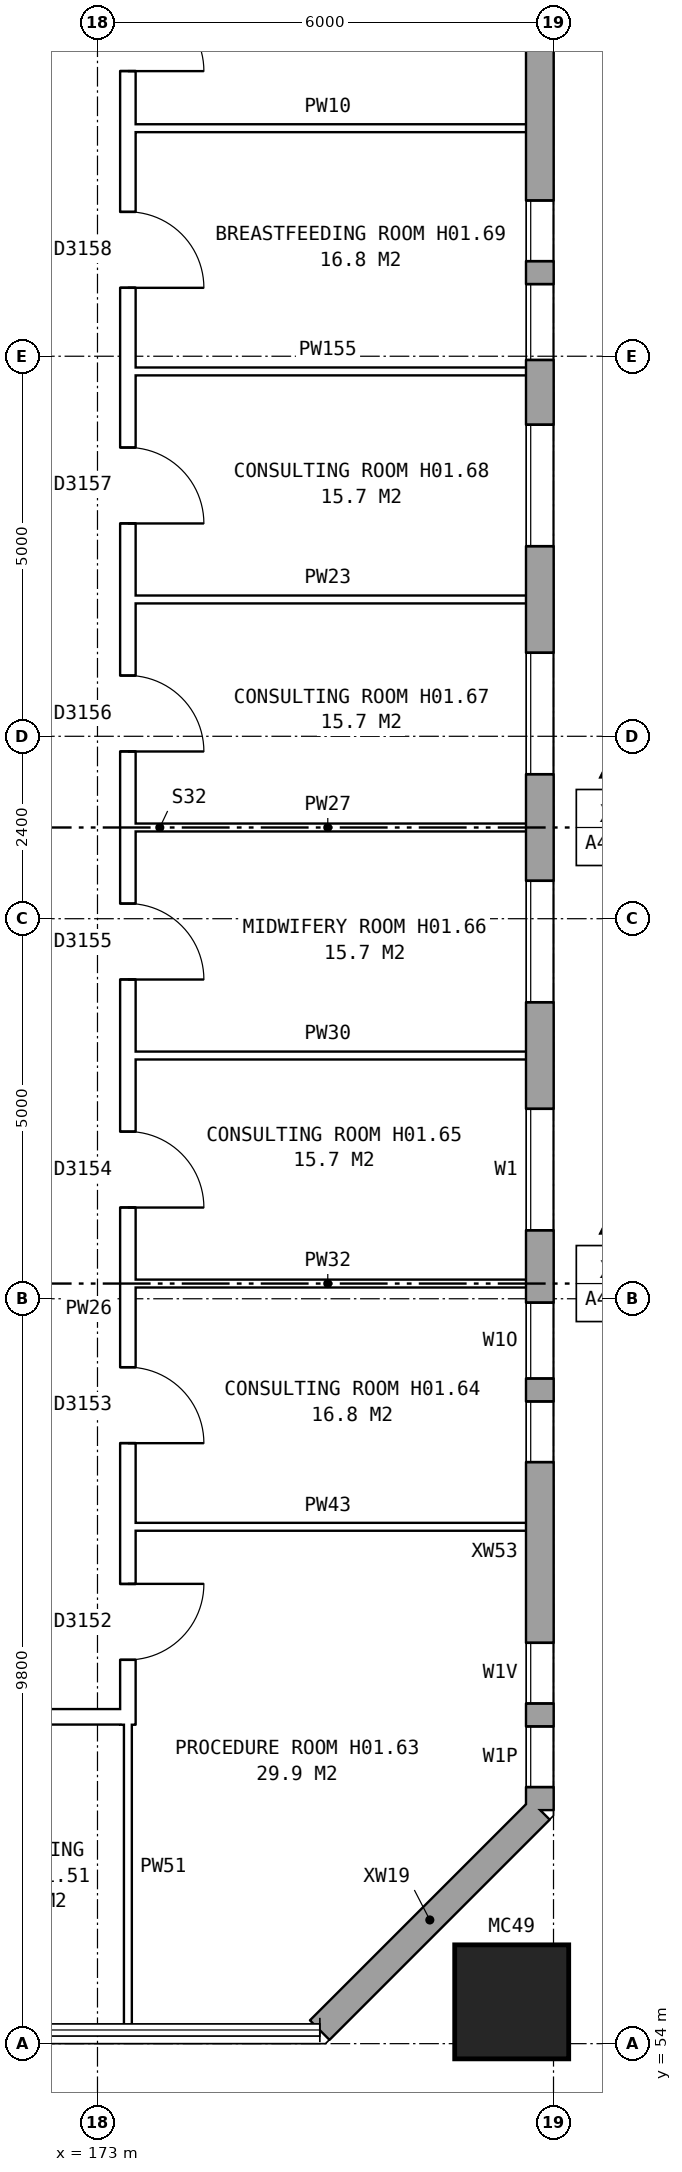
"""IFC4 building model, lengths in metres.
Left out: names, types, materials, properties, quantities, classifications, styles, units other than length and angle.
Written with IfcOpenShell. Run it as: python <this file> out.ifc"""

import sys

from ifc_helpers import new_model, si_unit, direction, frame, frame_2d, origin, origin_2d, place, context, subcontext, project, spatial, rectangle, hollow_rectangle, extrude, element, fill, save


model = new_model("IFC4")
c1 = context("Model", 3, precision=1e-05, world=origin(), true_north=direction((0.0, 1.0)))
c2 = subcontext(c1, "Body", "Model", "MODEL_VIEW")
j1 = project(units=[si_unit("LENGTHUNIT", "METRE"), si_unit("PLANEANGLEUNIT", "RADIAN")], contexts=[c1])
p1 = place(None, origin())
s1 = spatial("IfcSite", under=j1, at=p1, CompositionType="ELEMENT")
p2 = place(p1, origin())
s2 = spatial("IfcBuilding", under=s1, at=p2, CompositionType="ELEMENT")
p3 = place(p2, frame((0.0, 0.0, 5.5)))
s3 = spatial("IfcBuildingStorey", under=s2, at=p3, CompositionType="ELEMENT", Elevation=5.5)
p4 = place(p3, frame((178.45, 54.55, 0.0), z_axis=(0.0, 0.0, 1.0), x_axis=(1.0, 0.0, 0.0)))
e1 = element("IfcColumn", 1, at=p4, inside=s3, PredefinedType="COLUMN", context=c2, shape_type="SweptSolid", body=[
    extrude(hollow_rectangle(XDim=1.5, YDim=1.5, WallThickness=0.08, at=origin_2d()), origin(), (0.0, 0.0, 1.0), 4.6),
])
p5 = place(p3, frame((175.925, 54.18, 0.0), z_axis=(0.0, 0.0, 1.0), x_axis=(0.707106781187, 0.707106781187, 0.0)))
e2 = element("IfcWall", 2, at=p5, inside=s3, PredefinedType="STANDARD", context=c2, shape_type="SweptSolid", body=[
    extrude(rectangle(XDim=4.094, YDim=0.36, at=frame_2d((2.047, 0.0))), origin(), (0.0, 0.0, 1.0), 4.3),
])
p6 = place(p3, frame((178.82, 57.075, 0.0), z_axis=(0.0, 0.0, 1.0), x_axis=(0.0, 1.0, 0.0)))
e3 = element("IfcWall", 3, at=p6, inside=s3, PredefinedType="STANDARD", context=c2, shape_type="SweptSolid", body=[
    extrude(rectangle(XDim=25.851, YDim=0.36, at=frame_2d((12.925, 0.0))), origin(), (0.0, 0.0, 1.0), 4.3),
])
p7 = place(p6, frame((0.3, 0.0, 1.4)))
e4 = element("IfcOpeningElement", 4, at=p7, cuts=e3, PredefinedType="OPENING", context=c2, shape_type="SweptSolid", body=[
    extrude(rectangle(XDim=0.8, YDim=1.2, at=frame_2d((0.4, 0.6))), frame((0.0, 0.19, 0.0), z_axis=(0.0, -1.0, 0.0), x_axis=(1.0, 0.0, 0.0)), (0.0, 0.0, 1.0), 0.38),
])
p8 = place(p6, frame((4.575, 0.0, 0.8)))
e5 = element("IfcOpeningElement", 5, at=p8, cuts=e3, PredefinedType="OPENING", context=c2, shape_type="SweptSolid", body=[
    extrude(rectangle(XDim=0.8, YDim=0.9, at=frame_2d((0.4, 0.45))), frame((0.0, 0.19, 0.0), z_axis=(0.0, -1.0, 0.0), x_axis=(1.0, 0.0, 0.0)), (0.0, 0.0, 1.0), 0.38),
])
p9 = place(p6, frame((7.625, 0.0, 0.8)))
e6 = element("IfcOpeningElement", 6, at=p9, cuts=e3, PredefinedType="OPENING", context=c2, shape_type="SweptSolid", body=[
    extrude(rectangle(XDim=1.6, YDim=1.8, at=frame_2d((0.8, 0.9))), frame((0.0, 0.19, 0.0), z_axis=(0.0, -1.0, 0.0), x_axis=(1.0, 0.0, 0.0)), (0.0, 0.0, 1.0), 0.38),
])
p10 = place(p6, frame((10.625, 0.0, 0.8)))
e7 = element("IfcOpeningElement", 7, at=p10, cuts=e3, PredefinedType="OPENING", context=c2, shape_type="SweptSolid", body=[
    extrude(rectangle(XDim=1.6, YDim=1.8, at=frame_2d((0.8, 0.9))), frame((0.0, 0.19, 0.0), z_axis=(0.0, -1.0, 0.0), x_axis=(1.0, 0.0, 0.0)), (0.0, 0.0, 1.0), 0.38),
])
p11 = place(p6, frame((13.625, 0.0, 0.8)))
e8 = element("IfcOpeningElement", 8, at=p11, cuts=e3, PredefinedType="OPENING", context=c2, shape_type="SweptSolid", body=[
    extrude(rectangle(XDim=1.6, YDim=1.8, at=frame_2d((0.8, 0.9))), frame((0.0, 0.19, 0.0), z_axis=(0.0, -1.0, 0.0), x_axis=(1.0, 0.0, 0.0)), (0.0, 0.0, 1.0), 0.38),
])
p12 = place(p6, frame((16.625, 0.0, 0.8)))
e9 = element("IfcOpeningElement", 9, at=p12, cuts=e3, PredefinedType="OPENING", context=c2, shape_type="SweptSolid", body=[
    extrude(rectangle(XDim=1.6, YDim=1.8, at=frame_2d((0.8, 0.9))), frame((0.0, 0.19, 0.0), z_axis=(0.0, -1.0, 0.0), x_axis=(1.0, 0.0, 0.0)), (0.0, 0.0, 1.0), 0.38),
])
p13 = place(p6, frame((19.075, 0.0, 0.8)))
e10 = element("IfcOpeningElement", 10, at=p13, cuts=e3, PredefinedType="OPENING", context=c2, shape_type="SweptSolid", body=[
    extrude(rectangle(XDim=1.0, YDim=1.2, at=frame_2d((0.5, 0.6))), frame((0.0, 0.19, 0.0), z_axis=(0.0, -1.0, 0.0), x_axis=(1.0, 0.0, 0.0)), (0.0, 0.0, 1.0), 0.38),
])
p14 = place(p6, frame((23.525, 0.0, 1.7)))
e11 = element("IfcOpeningElement", 11, at=p14, cuts=e3, PredefinedType="OPENING", context=c2, shape_type="SweptSolid", body=[
    extrude(rectangle(XDim=0.8, YDim=0.9, at=frame_2d((0.4, 0.45))), frame((0.0, 0.19, 0.0), z_axis=(0.0, -1.0, 0.0), x_axis=(1.0, 0.0, 0.0)), (0.0, 0.0, 1.0), 0.38),
])
p15 = place(p6, frame((1.4, 0.0, 1.7)))
e12 = element("IfcOpeningElement", 12, at=p15, cuts=e3, PredefinedType="OPENING", context=c2, shape_type="SweptSolid", body=[
    extrude(rectangle(XDim=0.8, YDim=0.9, at=frame_2d((0.4, 0.45))), frame((0.0, 0.19, 0.0), z_axis=(0.0, -1.0, 0.0), x_axis=(1.0, 0.0, 0.0)), (0.0, 0.0, 1.0), 0.38),
])
p16 = place(p6, frame((5.675, 0.0, 0.8)))
e13 = element("IfcOpeningElement", 13, at=p16, cuts=e3, PredefinedType="OPENING", context=c2, shape_type="SweptSolid", body=[
    extrude(rectangle(XDim=1.0, YDim=1.2, at=frame_2d((0.5, 0.6))), frame((0.0, 0.19, 0.0), z_axis=(0.0, -1.0, 0.0), x_axis=(1.0, 0.0, 0.0)), (0.0, 0.0, 1.0), 0.38),
])
p17 = place(p6, frame((20.375, 0.0, 0.8)))
e14 = element("IfcOpeningElement", 14, at=p17, cuts=e3, PredefinedType="OPENING", context=c2, shape_type="SweptSolid", body=[
    extrude(rectangle(XDim=0.8, YDim=0.9, at=frame_2d((0.4, 0.45))), frame((0.0, 0.19, 0.0), z_axis=(0.0, -1.0, 0.0), x_axis=(1.0, 0.0, 0.0)), (0.0, 0.0, 1.0), 0.38),
])
p18 = place(p6, frame((24.625, 0.0, 1.4)))
e15 = element("IfcOpeningElement", 15, at=p18, cuts=e3, PredefinedType="OPENING", context=c2, shape_type="SweptSolid", body=[
    extrude(rectangle(XDim=0.8, YDim=1.2, at=frame_2d((0.4, 0.6))), frame((0.0, 0.19, 0.0), z_axis=(0.0, -1.0, 0.0), x_axis=(1.0, 0.0, 0.0)), (0.0, 0.0, 1.0), 0.38),
])
p19 = place(p3, frame((157.53, 58.3, 0.0), z_axis=(0.0, 0.0, 1.0), x_axis=(1.0, 0.0, 0.0)))
e16 = element("IfcWall", 16, at=p19, inside=s3, PredefinedType="PARTITIONING", context=c2, shape_type="SweptSolid", body=[
    extrude(rectangle(XDim=15.97, YDim=0.2, at=frame_2d((7.985, 0.0))), origin(), (0.0, 0.0, 1.0), 4.3),
])
p20 = place(p19, frame((2.795, 0.0, 0.0)))
e17 = element("IfcOpeningElement", 17, at=p20, cuts=e16, PredefinedType="OPENING", context=c2, shape_type="SweptSolid", body=[
    extrude(rectangle(XDim=1.0, YDim=2.1, at=frame_2d((0.5, 1.05))), frame((0.0, 0.11, 0.0), z_axis=(0.0, -1.0, 0.0), x_axis=(1.0, 0.0, 0.0)), (0.0, 0.0, 1.0), 0.22),
])
p21 = place(p19, frame((7.47, 0.0, 0.0)))
e18 = element("IfcOpeningElement", 18, at=p21, cuts=e16, PredefinedType="OPENING", context=c2, shape_type="SweptSolid", body=[
    extrude(rectangle(XDim=1.0, YDim=2.1, at=frame_2d((0.5, 1.05))), frame((0.0, 0.11, 0.0), z_axis=(0.0, -1.0, 0.0), x_axis=(1.0, 0.0, 0.0)), (0.0, 0.0, 1.0), 0.22),
])
p22 = place(p19, frame((10.47, 0.0, 0.0)))
e19 = element("IfcOpeningElement", 19, at=p22, cuts=e16, PredefinedType="OPENING", context=c2, shape_type="SweptSolid", body=[
    extrude(rectangle(XDim=1.0, YDim=2.1, at=frame_2d((0.5, 1.05))), frame((0.0, 0.11, 0.0), z_axis=(0.0, -1.0, 0.0), x_axis=(1.0, 0.0, 0.0)), (0.0, 0.0, 1.0), 0.22),
])
p23 = place(p19, frame((13.67, 0.0, 0.0)))
e20 = element("IfcOpeningElement", 20, at=p23, cuts=e16, PredefinedType="OPENING", context=c2, shape_type="SweptSolid", body=[
    extrude(rectangle(XDim=1.0, YDim=2.1, at=frame_2d((0.5, 1.05))), frame((0.0, 0.11, 0.0), z_axis=(0.0, -1.0, 0.0), x_axis=(1.0, 0.0, 0.0)), (0.0, 0.0, 1.0), 0.22),
])
for number, where, z_axis, x_axis in (
    (21, (173.3, 60.8, 0.0), (0.0, 0.0, 1.0), (1.0, 0.0, 0.0)),
    (22, (173.3, 64.0, 0.0), (0.0, 0.0, 1.0), (1.0, 0.0, 0.0)),
    (23, (173.3, 67.0, 0.0), (0.0, 0.0, 1.0), (1.0, 0.0, 0.0)),
    (24, (173.3, 70.0, 0.0), (0.0, 0.0, 1.0), (1.0, 0.0, 0.0)),
    (25, (173.3, 73.0, 0.0), (0.0, 0.0, 1.0), (1.0, 0.0, 0.0)),
    (26, (173.3, 76.0, 0.0), (0.0, 0.0, 1.0), (1.0, 0.0, 0.0)),
    (27, (173.3, 79.2, 0.0), (0.0, 0.0, 1.0), (1.0, 0.0, 0.0)),
):
    element("IfcWall", number, at=place(p3, frame(where, z_axis=z_axis, x_axis=x_axis)), inside=s3, PredefinedType="PARTITIONING", context=c2, shape_type="SweptSolid", body=[
        extrude(rectangle(XDim=5.46, YDim=0.1, at=frame_2d((2.73, 0.0))), origin(), (0.0, 0.0, 1.0), 4.3),
    ])
p24 = place(p3, frame((173.4, 58.198, 0.0), z_axis=(0.0, 0.0, 1.0), x_axis=(0.0, 1.0, 0.0)))
e28 = element("IfcWall", 28, at=p24, inside=s3, PredefinedType="PARTITIONING", context=c2, shape_type="SweptSolid", body=[
    extrude(rectangle(XDim=23.604, YDim=0.2, at=frame_2d((11.802, 0.0))), origin(), (0.0, 0.0, 1.0), 4.3),
])
p25 = place(p24, frame((0.851, 0.0, 0.0)))
e29 = element("IfcOpeningElement", 29, at=p25, cuts=e28, PredefinedType="OPENING", context=c2, shape_type="SweptSolid", body=[
    extrude(rectangle(XDim=1.0, YDim=2.1, at=frame_2d((0.5, 1.05))), frame((0.0, 0.11, 0.0), z_axis=(0.0, -1.0, 0.0), x_axis=(1.0, 0.0, 0.0)), (0.0, 0.0, 1.0), 0.22),
])
p26 = place(p24, frame((3.702, 0.0, 0.0)))
e30 = element("IfcOpeningElement", 30, at=p26, cuts=e28, PredefinedType="OPENING", context=c2, shape_type="SweptSolid", body=[
    extrude(rectangle(XDim=1.0, YDim=2.1, at=frame_2d((0.5, 1.05))), frame((0.0, 0.11, 0.0), z_axis=(0.0, -1.0, 0.0), x_axis=(1.0, 0.0, 0.0)), (0.0, 0.0, 1.0), 0.22),
])
p27 = place(p24, frame((6.802, 0.0, 0.0)))
e31 = element("IfcOpeningElement", 31, at=p27, cuts=e28, PredefinedType="OPENING", context=c2, shape_type="SweptSolid", body=[
    extrude(rectangle(XDim=1.0, YDim=2.1, at=frame_2d((0.5, 1.05))), frame((0.0, 0.11, 0.0), z_axis=(0.0, -1.0, 0.0), x_axis=(1.0, 0.0, 0.0)), (0.0, 0.0, 1.0), 0.22),
])
p28 = place(p24, frame((9.802, 0.0, 0.0)))
e32 = element("IfcOpeningElement", 32, at=p28, cuts=e28, PredefinedType="OPENING", context=c2, shape_type="SweptSolid", body=[
    extrude(rectangle(XDim=1.0, YDim=2.1, at=frame_2d((0.5, 1.05))), frame((0.0, 0.11, 0.0), z_axis=(0.0, -1.0, 0.0), x_axis=(1.0, 0.0, 0.0)), (0.0, 0.0, 1.0), 0.22),
])
p29 = place(p24, frame((12.802, 0.0, 0.0)))
e33 = element("IfcOpeningElement", 33, at=p29, cuts=e28, PredefinedType="OPENING", context=c2, shape_type="SweptSolid", body=[
    extrude(rectangle(XDim=1.0, YDim=2.1, at=frame_2d((0.5, 1.05))), frame((0.0, 0.11, 0.0), z_axis=(0.0, -1.0, 0.0), x_axis=(1.0, 0.0, 0.0)), (0.0, 0.0, 1.0), 0.22),
])
p30 = place(p24, frame((15.802, 0.0, 0.0)))
e34 = element("IfcOpeningElement", 34, at=p30, cuts=e28, PredefinedType="OPENING", context=c2, shape_type="SweptSolid", body=[
    extrude(rectangle(XDim=1.0, YDim=2.1, at=frame_2d((0.5, 1.05))), frame((0.0, 0.11, 0.0), z_axis=(0.0, -1.0, 0.0), x_axis=(1.0, 0.0, 0.0)), (0.0, 0.0, 1.0), 0.22),
])
p31 = place(p24, frame((18.902, 0.0, 0.0)))
e35 = element("IfcOpeningElement", 35, at=p31, cuts=e28, PredefinedType="OPENING", context=c2, shape_type="SweptSolid", body=[
    extrude(rectangle(XDim=1.0, YDim=2.1, at=frame_2d((0.5, 1.05))), frame((0.0, 0.11, 0.0), z_axis=(0.0, -1.0, 0.0), x_axis=(1.0, 0.0, 0.0)), (0.0, 0.0, 1.0), 0.22),
])
p32 = place(p24, frame((21.753, 0.0, 0.0)))
e36 = element("IfcOpeningElement", 36, at=p32, cuts=e28, PredefinedType="OPENING", context=c2, shape_type="SweptSolid", body=[
    extrude(rectangle(XDim=1.0, YDim=2.1, at=frame_2d((0.5, 1.05))), frame((0.0, 0.11, 0.0), z_axis=(0.0, -1.0, 0.0), x_axis=(1.0, 0.0, 0.0)), (0.0, 0.0, 1.0), 0.22),
])
p33 = place(p3, frame((173.4, 54.24, 0.0), z_axis=(0.0, 0.0, 1.0), x_axis=(0.0, 1.0, 0.0)))
e37 = element("IfcWall", 37, at=p33, inside=s3, PredefinedType="PARTITIONING", context=c2, shape_type="SweptSolid", body=[
    extrude(rectangle(XDim=4.162, YDim=0.1, at=frame_2d((2.081, 0.0))), origin(), (0.0, 0.0, 1.0), 4.3),
])
p34 = place(p7, origin())
e38 = element("IfcWindow", 38, at=p34, inside=s3, PartitioningType="SINGLE_PANEL", PredefinedType="WINDOW", context=c2, shape_type="SweptSolid", body=[
    extrude(rectangle(XDim=0.8, YDim=1.2, at=frame_2d((0.4, 0.6))), frame((0.0, 0.15, 0.0), z_axis=(0.0, -1.0, 0.0), x_axis=(1.0, 0.0, 0.0)), (0.0, 0.0, 1.0), 0.06),
])
fill(e4, e38)
p35 = place(p8, origin())
e39 = element("IfcWindow", 39, at=p35, inside=s3, PartitioningType="SINGLE_PANEL", PredefinedType="WINDOW", context=c2, shape_type="SweptSolid", body=[
    extrude(rectangle(XDim=0.8, YDim=0.9, at=frame_2d((0.4, 0.45))), frame((0.0, 0.15, 0.0), z_axis=(0.0, -1.0, 0.0), x_axis=(1.0, 0.0, 0.0)), (0.0, 0.0, 1.0), 0.06),
])
fill(e5, e39)
p36 = place(p9, origin())
e40 = element("IfcWindow", 40, at=p36, inside=s3, PartitioningType="SINGLE_PANEL", PredefinedType="WINDOW", context=c2, shape_type="SweptSolid", body=[
    extrude(rectangle(XDim=1.6, YDim=1.8, at=frame_2d((0.8, 0.9))), frame((0.0, 0.15, 0.0), z_axis=(0.0, -1.0, 0.0), x_axis=(1.0, 0.0, 0.0)), (0.0, 0.0, 1.0), 0.06),
])
fill(e6, e40)
p37 = place(p10, origin())
e41 = element("IfcWindow", 41, at=p37, inside=s3, PartitioningType="SINGLE_PANEL", PredefinedType="WINDOW", context=c2, shape_type="SweptSolid", body=[
    extrude(rectangle(XDim=1.6, YDim=1.8, at=frame_2d((0.8, 0.9))), frame((0.0, 0.15, 0.0), z_axis=(0.0, -1.0, 0.0), x_axis=(1.0, 0.0, 0.0)), (0.0, 0.0, 1.0), 0.06),
])
fill(e7, e41)
p38 = place(p11, origin())
e42 = element("IfcWindow", 42, at=p38, inside=s3, PartitioningType="SINGLE_PANEL", PredefinedType="WINDOW", context=c2, shape_type="SweptSolid", body=[
    extrude(rectangle(XDim=1.6, YDim=1.8, at=frame_2d((0.8, 0.9))), frame((0.0, 0.15, 0.0), z_axis=(0.0, -1.0, 0.0), x_axis=(1.0, 0.0, 0.0)), (0.0, 0.0, 1.0), 0.06),
])
fill(e8, e42)
p39 = place(p12, origin())
e43 = element("IfcWindow", 43, at=p39, inside=s3, PartitioningType="SINGLE_PANEL", PredefinedType="WINDOW", context=c2, shape_type="SweptSolid", body=[
    extrude(rectangle(XDim=1.6, YDim=1.8, at=frame_2d((0.8, 0.9))), frame((0.0, 0.15, 0.0), z_axis=(0.0, -1.0, 0.0), x_axis=(1.0, 0.0, 0.0)), (0.0, 0.0, 1.0), 0.06),
])
fill(e9, e43)
p40 = place(p13, origin())
e44 = element("IfcWindow", 44, at=p40, inside=s3, PartitioningType="SINGLE_PANEL", PredefinedType="WINDOW", context=c2, shape_type="SweptSolid", body=[
    extrude(rectangle(XDim=1.0, YDim=1.2, at=frame_2d((0.5, 0.6))), frame((0.0, 0.15, 0.0), z_axis=(0.0, -1.0, 0.0), x_axis=(1.0, 0.0, 0.0)), (0.0, 0.0, 1.0), 0.06),
])
fill(e10, e44)
p41 = place(p25, frame((1.0, 0.0, 0.0), z_axis=(0.0, 0.0, 1.0), x_axis=(-1.0, 0.0, 0.0)))
e45 = element("IfcDoor", 45, at=p41, inside=s3, OperationType="SINGLE_SWING_LEFT", PredefinedType="DOOR", context=c2, shape_type="SweptSolid", body=[
    extrude(rectangle(XDim=1.0, YDim=2.1, at=frame_2d((0.5, 1.05))), frame((0.0, 0.025, 0.0), z_axis=(0.0, -1.0, 0.0), x_axis=(1.0, 0.0, 0.0)), (0.0, 0.0, 1.0), 0.05),
])
fill(e29, e45)
p42 = place(p26, frame((1.0, 0.0, 0.0), z_axis=(0.0, 0.0, 1.0), x_axis=(-1.0, 0.0, 0.0)))
e46 = element("IfcDoor", 46, at=p42, inside=s3, OperationType="SINGLE_SWING_RIGHT", PredefinedType="DOOR", context=c2, shape_type="SweptSolid", body=[
    extrude(rectangle(XDim=1.0, YDim=2.1, at=frame_2d((0.5, 1.05))), frame((0.0, 0.025, 0.0), z_axis=(0.0, -1.0, 0.0), x_axis=(1.0, 0.0, 0.0)), (0.0, 0.0, 1.0), 0.05),
])
fill(e30, e46)
p43 = place(p27, frame((1.0, 0.0, 0.0), z_axis=(0.0, 0.0, 1.0), x_axis=(-1.0, 0.0, 0.0)))
e47 = element("IfcDoor", 47, at=p43, inside=s3, OperationType="SINGLE_SWING_RIGHT", PredefinedType="DOOR", context=c2, shape_type="SweptSolid", body=[
    extrude(rectangle(XDim=1.0, YDim=2.1, at=frame_2d((0.5, 1.05))), frame((0.0, 0.025, 0.0), z_axis=(0.0, -1.0, 0.0), x_axis=(1.0, 0.0, 0.0)), (0.0, 0.0, 1.0), 0.05),
])
fill(e31, e47)
p44 = place(p28, frame((1.0, 0.0, 0.0), z_axis=(0.0, 0.0, 1.0), x_axis=(-1.0, 0.0, 0.0)))
e48 = element("IfcDoor", 48, at=p44, inside=s3, OperationType="SINGLE_SWING_RIGHT", PredefinedType="DOOR", context=c2, shape_type="SweptSolid", body=[
    extrude(rectangle(XDim=1.0, YDim=2.1, at=frame_2d((0.5, 1.05))), frame((0.0, 0.025, 0.0), z_axis=(0.0, -1.0, 0.0), x_axis=(1.0, 0.0, 0.0)), (0.0, 0.0, 1.0), 0.05),
])
fill(e32, e48)
p45 = place(p29, frame((1.0, 0.0, 0.0), z_axis=(0.0, 0.0, 1.0), x_axis=(-1.0, 0.0, 0.0)))
e49 = element("IfcDoor", 49, at=p45, inside=s3, OperationType="SINGLE_SWING_RIGHT", PredefinedType="DOOR", context=c2, shape_type="SweptSolid", body=[
    extrude(rectangle(XDim=1.0, YDim=2.1, at=frame_2d((0.5, 1.05))), frame((0.0, 0.025, 0.0), z_axis=(0.0, -1.0, 0.0), x_axis=(1.0, 0.0, 0.0)), (0.0, 0.0, 1.0), 0.05),
])
fill(e33, e49)
p46 = place(p30, frame((1.0, 0.0, 0.0), z_axis=(0.0, 0.0, 1.0), x_axis=(-1.0, 0.0, 0.0)))
e50 = element("IfcDoor", 50, at=p46, inside=s3, OperationType="SINGLE_SWING_RIGHT", PredefinedType="DOOR", context=c2, shape_type="SweptSolid", body=[
    extrude(rectangle(XDim=1.0, YDim=2.1, at=frame_2d((0.5, 1.05))), frame((0.0, 0.025, 0.0), z_axis=(0.0, -1.0, 0.0), x_axis=(1.0, 0.0, 0.0)), (0.0, 0.0, 1.0), 0.05),
])
fill(e34, e50)
p47 = place(p31, frame((1.0, 0.0, 0.0), z_axis=(0.0, 0.0, 1.0), x_axis=(-1.0, 0.0, 0.0)))
e51 = element("IfcDoor", 51, at=p47, inside=s3, OperationType="SINGLE_SWING_RIGHT", PredefinedType="DOOR", context=c2, shape_type="SweptSolid", body=[
    extrude(rectangle(XDim=1.0, YDim=2.1, at=frame_2d((0.5, 1.05))), frame((0.0, 0.025, 0.0), z_axis=(0.0, -1.0, 0.0), x_axis=(1.0, 0.0, 0.0)), (0.0, 0.0, 1.0), 0.05),
])
fill(e35, e51)
p48 = place(p32, frame((1.0, 0.0, 0.0), z_axis=(0.0, 0.0, 1.0), x_axis=(-1.0, 0.0, 0.0)))
e52 = element("IfcDoor", 52, at=p48, inside=s3, OperationType="SINGLE_SWING_RIGHT", PredefinedType="DOOR", context=c2, shape_type="SweptSolid", body=[
    extrude(rectangle(XDim=1.0, YDim=2.1, at=frame_2d((0.5, 1.05))), frame((0.0, 0.025, 0.0), z_axis=(0.0, -1.0, 0.0), x_axis=(1.0, 0.0, 0.0)), (0.0, 0.0, 1.0), 0.05),
])
fill(e36, e52)
p49 = place(p15, origin())
e53 = element("IfcWindow", 53, at=p49, inside=s3, PartitioningType="SINGLE_PANEL", PredefinedType="WINDOW", context=c2, shape_type="SweptSolid", body=[
    extrude(rectangle(XDim=0.8, YDim=0.9, at=frame_2d((0.4, 0.45))), frame((0.0, 0.15, 0.0), z_axis=(0.0, -1.0, 0.0), x_axis=(1.0, 0.0, 0.0)), (0.0, 0.0, 1.0), 0.06),
])
fill(e12, e53)
p50 = place(p16, origin())
e54 = element("IfcWindow", 54, at=p50, inside=s3, PartitioningType="SINGLE_PANEL", PredefinedType="WINDOW", context=c2, shape_type="SweptSolid", body=[
    extrude(rectangle(XDim=1.0, YDim=1.2, at=frame_2d((0.5, 0.6))), frame((0.0, 0.15, 0.0), z_axis=(0.0, -1.0, 0.0), x_axis=(1.0, 0.0, 0.0)), (0.0, 0.0, 1.0), 0.06),
])
fill(e13, e54)
p51 = place(p17, origin())
e55 = element("IfcWindow", 55, at=p51, inside=s3, PartitioningType="SINGLE_PANEL", PredefinedType="WINDOW", context=c2, shape_type="SweptSolid", body=[
    extrude(rectangle(XDim=0.8, YDim=0.9, at=frame_2d((0.4, 0.45))), frame((0.0, 0.15, 0.0), z_axis=(0.0, -1.0, 0.0), x_axis=(1.0, 0.0, 0.0)), (0.0, 0.0, 1.0), 0.06),
])
fill(e14, e55)
save(model, sys.argv[1])
